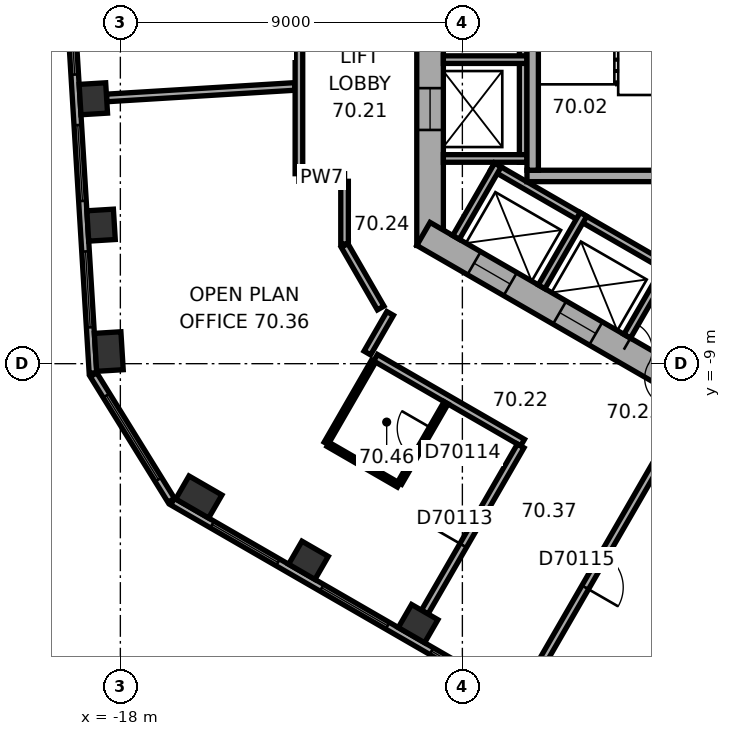
"""IFC4 building model, lengths in metres.
Left out: names, types, materials, properties, quantities, classifications, styles, units other than length and angle.
Written with IfcOpenShell. Run it as: python <this file> out.ifc"""

import sys

from ifc_helpers import new_model, si_unit, direction, frame, frame_2d, origin, origin_2d, place, context, subcontext, project, spatial, rectangle, extrude, element, fill, save


model = new_model("IFC4")
c1 = context("Model", 3, precision=1e-05, world=origin(), true_north=direction((0.0, 1.0)))
c2 = subcontext(c1, "Body", "Model", "MODEL_VIEW")
j1 = project(units=[si_unit("LENGTHUNIT", "METRE"), si_unit("PLANEANGLEUNIT", "RADIAN")], contexts=[c1])
p1 = place(None, origin())
s1 = spatial("IfcSite", under=j1, at=p1, CompositionType="ELEMENT")
p2 = place(p1, origin())
s2 = spatial("IfcBuilding", under=s1, at=p2, CompositionType="ELEMENT")
p3 = place(p2, frame((0.0, 0.0, 285.7)))
s3 = spatial("IfcBuildingStorey", under=s2, at=p3, CompositionType="ELEMENT", Elevation=285.7)
for number, where, z_axis, x_axis in (
    (1, (-18.711, -2.03, 0.0), (0.0, 0.0, 1.0), (0.061, -0.998, 0.0)),
    (2, (-18.508, -5.355, 0.0), (0.0, 0.0, 1.0), (0.061, -0.998, 0.0)),
):
    element("IfcColumn", number, at=place(p3, frame(where, z_axis=z_axis, x_axis=x_axis)), inside=s3, PredefinedType="COLUMN", context=c2, shape_type="SweptSolid", body=[
        extrude(rectangle(XDim=0.8, YDim=0.7, at=origin_2d()), origin(), (0.0, 0.0, 1.0), 3.7),
    ])
for number, where, z_axis, x_axis in (
    (3, (-18.304, -8.68, 0.0), (0.0, 0.0, 1.0), (0.061, -0.998, 0.0)),
    (4, (-15.936, -12.508, 0.0), (0.0, 0.0, 1.0), (0.866, -0.5, 0.0)),
):
    element("IfcColumn", number, at=place(p3, frame(where, z_axis=z_axis, x_axis=x_axis)), inside=s3, PredefinedType="COLUMN", context=c2, shape_type="SweptSolid", body=[
        extrude(rectangle(XDim=1.0, YDim=0.7, at=origin_2d()), origin(), (0.0, 0.0, 1.0), 3.7),
    ])
for number, where, z_axis, x_axis in (
    (5, (-13.05, -14.174, 0.0), (0.0, 0.0, 1.0), (0.866, -0.5, 0.0)),
    (6, (-10.165, -15.84, 0.0), (0.0, 0.0, 1.0), (0.866, -0.5, 0.0)),
):
    element("IfcColumn", number, at=place(p3, frame(where, z_axis=z_axis, x_axis=x_axis)), inside=s3, PredefinedType="COLUMN", context=c2, shape_type="SweptSolid", body=[
        extrude(rectangle(XDim=0.8, YDim=0.7, at=origin_2d()), origin(), (0.0, 0.0, 1.0), 3.7),
    ])
p4 = place(p3, frame((-9.85, 5.889, 0.0), z_axis=(0.0, 0.0, 1.0), x_axis=(0.0, -1.0, 0.0)))
e7 = element("IfcWall", 7, at=p4, inside=s3, PredefinedType="SHEAR", context=c2, shape_type="SweptSolid", body=[
    extrude(rectangle(XDim=11.778, YDim=0.7, at=frame_2d((5.889, 0.0))), origin(), (0.0, 0.0, 1.0), 3.7),
])
p5 = place(p4, frame((5.039, 0.0, 0.0)))
e8 = element("IfcOpeningElement", 8, at=p5, cuts=e7, PredefinedType="OPENING", context=c2, shape_type="SweptSolid", body=[
    extrude(rectangle(XDim=1.1, YDim=2.1, at=frame_2d((0.55, 1.05))), frame((0.0, 0.36, 0.0), z_axis=(0.0, -1.0, 0.0), x_axis=(1.0, 0.0, 0.0)), (0.0, 0.0, 1.0), 0.72),
])
p6 = place(p4, frame((7.639, 0.0, 0.0)))
e9 = element("IfcOpeningElement", 9, at=p6, cuts=e7, PredefinedType="OPENING", context=c2, shape_type="SweptSolid", body=[
    extrude(rectangle(XDim=1.1, YDim=2.1, at=frame_2d((0.55, 1.05))), frame((0.0, 0.36, 0.0), z_axis=(0.0, -1.0, 0.0), x_axis=(1.0, 0.0, 0.0)), (0.0, 0.0, 1.0), 0.72),
])
p7 = place(p3, frame((-10.025, -5.586, 0.0), z_axis=(0.0, 0.0, 1.0), x_axis=(0.866026453023, -0.499998182661, 0.0)))
e10 = element("IfcWall", 10, at=p7, inside=s3, PredefinedType="SHEAR", context=c2, shape_type="SweptSolid", body=[
    extrude(rectangle(XDim=11.778, YDim=0.7, at=frame_2d((5.889, 0.0))), origin(), (0.0, 0.0, 1.0), 3.7),
])
p8 = place(p7, frame((6.089, 0.0, 0.0)))
e11 = element("IfcOpeningElement", 11, at=p8, cuts=e10, PredefinedType="OPENING", context=c2, shape_type="SweptSolid", body=[
    extrude(rectangle(XDim=1.5, YDim=2.1, at=frame_2d((0.75, 1.05))), frame((0.0, 0.36, 0.0), z_axis=(0.0, -1.0, 0.0), x_axis=(1.0, 0.0, 0.0)), (0.0, 0.0, 1.0), 0.72),
])
p9 = place(p7, frame((1.539, 0.0, 0.0)))
e12 = element("IfcOpeningElement", 12, at=p9, cuts=e10, PredefinedType="OPENING", context=c2, shape_type="SweptSolid", body=[
    extrude(rectangle(XDim=1.1, YDim=2.1, at=frame_2d((0.55, 1.05))), frame((0.0, 0.36, 0.0), z_axis=(0.0, -1.0, 0.0), x_axis=(1.0, 0.0, 0.0)), (0.0, 0.0, 1.0), 0.72),
])
p10 = place(p7, frame((4.139, 0.0, 0.0)))
e13 = element("IfcOpeningElement", 13, at=p10, cuts=e10, PredefinedType="OPENING", context=c2, shape_type="SweptSolid", body=[
    extrude(rectangle(XDim=1.1, YDim=2.1, at=frame_2d((0.55, 1.05))), frame((0.0, 0.36, 0.0), z_axis=(0.0, -1.0, 0.0), x_axis=(1.0, 0.0, 0.0)), (0.0, 0.0, 1.0), 0.72),
])
p11 = place(p3, frame((-19.803, 8.454, 0.0), z_axis=(0.0, 0.0, 1.0), x_axis=(0.061036717565, -0.998135521414, 0.0)))
e14 = element("IfcWall", 14, at=p11, inside=s3, PredefinedType="STANDARD", context=c2, shape_type="SweptSolid", body=[
    extrude(rectangle(XDim=17.731, YDim=0.2, at=frame_2d((8.866, 0.0))), origin(), (0.0, 0.0, 1.0), 3.7),
])
p12 = place(p11, frame((1.202, 0.0, 0.9)))
e15 = element("IfcOpeningElement", 15, at=p12, cuts=e14, PredefinedType="OPENING", context=c2, shape_type="SweptSolid", body=[
    extrude(rectangle(XDim=2.0, YDim=2.0, at=frame_2d((1.0, 1.0))), frame((0.0, 0.11, 0.0), z_axis=(0.0, -1.0, 0.0), x_axis=(1.0, 0.0, 0.0)), (0.0, 0.0, 1.0), 0.22),
])
p13 = place(p11, frame((4.533, 0.0, 0.9)))
e16 = element("IfcOpeningElement", 16, at=p13, cuts=e14, PredefinedType="OPENING", context=c2, shape_type="SweptSolid", body=[
    extrude(rectangle(XDim=2.0, YDim=2.0, at=frame_2d((1.0, 1.0))), frame((0.0, 0.11, 0.0), z_axis=(0.0, -1.0, 0.0), x_axis=(1.0, 0.0, 0.0)), (0.0, 0.0, 1.0), 0.22),
])
p14 = place(p11, frame((7.865, 0.0, 0.9)))
e17 = element("IfcOpeningElement", 17, at=p14, cuts=e14, PredefinedType="OPENING", context=c2, shape_type="SweptSolid", body=[
    extrude(rectangle(XDim=2.0, YDim=2.0, at=frame_2d((1.0, 1.0))), frame((0.0, 0.11, 0.0), z_axis=(0.0, -1.0, 0.0), x_axis=(1.0, 0.0, 0.0)), (0.0, 0.0, 1.0), 0.22),
])
p15 = place(p11, frame((11.197, 0.0, 0.9)))
e18 = element("IfcOpeningElement", 18, at=p15, cuts=e14, PredefinedType="OPENING", context=c2, shape_type="SweptSolid", body=[
    extrude(rectangle(XDim=2.0, YDim=2.0, at=frame_2d((1.0, 1.0))), frame((0.0, 0.11, 0.0), z_axis=(0.0, -1.0, 0.0), x_axis=(1.0, 0.0, 0.0)), (0.0, 0.0, 1.0), 0.22),
])
p16 = place(p11, frame((14.528, 0.0, 0.9)))
e19 = element("IfcOpeningElement", 19, at=p16, cuts=e14, PredefinedType="OPENING", context=c2, shape_type="SweptSolid", body=[
    extrude(rectangle(XDim=2.0, YDim=2.0, at=frame_2d((1.0, 1.0))), frame((0.0, 0.11, 0.0), z_axis=(0.0, -1.0, 0.0), x_axis=(1.0, 0.0, 0.0)), (0.0, 0.0, 1.0), 0.22),
])
p17 = place(p3, frame((-18.706, -9.291, 0.0), z_axis=(0.0, 0.0, 1.0), x_axis=(0.526209683648, -0.850354848775, 0.0)))
e20 = element("IfcWall", 20, at=p17, inside=s3, PredefinedType="STANDARD", context=c2, shape_type="SweptSolid", body=[
    extrude(rectangle(XDim=3.886, YDim=0.2, at=frame_2d((1.943, 0.0))), origin(), (0.0, 0.0, 1.0), 3.7),
])
p18 = place(p17, frame((0.643, 0.0, 0.9)))
e21 = element("IfcOpeningElement", 21, at=p18, cuts=e20, PredefinedType="OPENING", context=c2, shape_type="SweptSolid", body=[
    extrude(rectangle(XDim=2.6, YDim=2.0, at=frame_2d((1.3, 1.0))), frame((0.0, 0.11, 0.0), z_axis=(0.0, -1.0, 0.0), x_axis=(1.0, 0.0, 0.0)), (0.0, 0.0, 1.0), 0.22),
])
p19 = place(p3, frame((-16.626, -12.629, 0.0), z_axis=(0.0, 0.0, 1.0), x_axis=(0.866026460444, -0.499998169808, 0.0)))
e22 = element("IfcWall", 22, at=p19, inside=s3, PredefinedType="STANDARD", context=c2, shape_type="SweptSolid", body=[
    extrude(rectangle(XDim=17.731, YDim=0.2, at=frame_2d((8.866, 0.0))), origin(), (0.0, 0.0, 1.0), 3.7),
])
p20 = place(p19, frame((1.203, 0.0, 0.9)))
e23 = element("IfcOpeningElement", 23, at=p20, cuts=e22, PredefinedType="OPENING", context=c2, shape_type="SweptSolid", body=[
    extrude(rectangle(XDim=2.0, YDim=2.0, at=frame_2d((1.0, 1.0))), frame((0.0, 0.11, 0.0), z_axis=(0.0, -1.0, 0.0), x_axis=(1.0, 0.0, 0.0)), (0.0, 0.0, 1.0), 0.22),
])
p21 = place(p19, frame((4.535, 0.0, 0.9)))
e24 = element("IfcOpeningElement", 24, at=p21, cuts=e22, PredefinedType="OPENING", context=c2, shape_type="SweptSolid", body=[
    extrude(rectangle(XDim=2.0, YDim=2.0, at=frame_2d((1.0, 1.0))), frame((0.0, 0.11, 0.0), z_axis=(0.0, -1.0, 0.0), x_axis=(1.0, 0.0, 0.0)), (0.0, 0.0, 1.0), 0.22),
])
p22 = place(p19, frame((7.867, 0.0, 0.9)))
e25 = element("IfcOpeningElement", 25, at=p22, cuts=e22, PredefinedType="OPENING", context=c2, shape_type="SweptSolid", body=[
    extrude(rectangle(XDim=2.0, YDim=2.0, at=frame_2d((1.0, 1.0))), frame((0.0, 0.11, 0.0), z_axis=(0.0, -1.0, 0.0), x_axis=(1.0, 0.0, 0.0)), (0.0, 0.0, 1.0), 0.22),
])
p23 = place(p19, frame((11.198, 0.0, 0.9)))
e26 = element("IfcOpeningElement", 26, at=p23, cuts=e22, PredefinedType="OPENING", context=c2, shape_type="SweptSolid", body=[
    extrude(rectangle(XDim=2.0, YDim=2.0, at=frame_2d((1.0, 1.0))), frame((0.0, 0.11, 0.0), z_axis=(0.0, -1.0, 0.0), x_axis=(1.0, 0.0, 0.0)), (0.0, 0.0, 1.0), 0.22),
])
p24 = place(p19, frame((14.53, 0.0, 0.9)))
e27 = element("IfcOpeningElement", 27, at=p24, cuts=e22, PredefinedType="OPENING", context=c2, shape_type="SweptSolid", body=[
    extrude(rectangle(XDim=2.0, YDim=2.0, at=frame_2d((1.0, 1.0))), frame((0.0, 0.11, 0.0), z_axis=(0.0, -1.0, 0.0), x_axis=(1.0, 0.0, 0.0)), (0.0, 0.0, 1.0), 0.22),
])
p25 = place(p3, frame((-7.4, 4.3, 0.0), z_axis=(0.0, 0.0, 1.0), x_axis=(0.0, -1.0, 0.0)))
e28 = element("IfcWall", 28, at=p25, inside=s3, PredefinedType="PARTITIONING", context=c2, shape_type="SweptSolid", body=[
    extrude(rectangle(XDim=8.0, YDim=0.2, at=frame_2d((4.0, 0.0))), origin(), (0.0, 0.0, 1.0), 3.42),
])
for number, where, z_axis, x_axis in (
    (29, (-7.3, -1.0, 0.0), (0.0, 0.0, 1.0), (-1.0, 0.0, 0.0)),
    (30, (-7.3, -3.6, 0.0), (0.0, 0.0, 1.0), (-1.0, 0.0, 0.0)),
):
    element("IfcWall", number, at=place(p3, frame(where, z_axis=z_axis, x_axis=x_axis)), inside=s3, PredefinedType="PARTITIONING", context=c2, shape_type="SweptSolid", body=[
        extrude(rectangle(XDim=2.2, YDim=0.2, at=frame_2d((1.1, 0.0))), origin(), (0.0, 0.0, 1.0), 3.42),
    ])
p26 = place(p3, frame((-8.203, -3.809, 0.0), z_axis=(0.0, 0.0, 1.0), x_axis=(0.866028230842, -0.499995103361, 0.0)))
e31 = element("IfcWall", 31, at=p26, inside=s3, PredefinedType="PARTITIONING", context=c2, shape_type="SweptSolid", body=[
    extrude(rectangle(XDim=5.4, YDim=0.2, at=frame_2d((2.7, 0.0))), origin(), (0.0, 0.0, 1.0), 3.42),
])
for number, where, z_axis, x_axis in (
    (32, (-8.067, -3.772, 0.0), (0.0, 0.0, 1.0), (-0.5, -0.866, 0.0)),
    (33, (-5.815, -5.072, 0.0), (0.0, 0.0, 1.0), (-0.5, -0.866, 0.0)),
):
    element("IfcWall", number, at=place(p3, frame(where, z_axis=z_axis, x_axis=x_axis)), inside=s3, PredefinedType="PARTITIONING", context=c2, shape_type="SweptSolid", body=[
        extrude(rectangle(XDim=2.2, YDim=0.2, at=frame_2d((1.1, 0.0))), origin(), (0.0, 0.0, 1.0), 3.42),
    ])
p27 = place(p3, frame((-3.563, -6.372, 0.0), z_axis=(0.0, 0.0, 1.0), x_axis=(-0.499994660107, -0.866028486751, 0.0)))
e34 = element("IfcWall", 34, at=p27, inside=s3, PredefinedType="PARTITIONING", context=c2, shape_type="SweptSolid", body=[
    extrude(rectangle(XDim=2.2, YDim=0.2, at=frame_2d((1.1, 0.0))), origin(), (0.0, 0.0, 1.0), 3.42),
])
p28 = place(p3, frame((-2.6, -4.06, 0.0), z_axis=(0.0, 0.0, 1.0), x_axis=(-1.0, 0.0, 0.0)))
e35 = element("IfcWall", 35, at=p28, inside=s3, PredefinedType="SHEAR", context=c2, shape_type="SweptSolid", body=[
    extrude(rectangle(XDim=4.7, YDim=0.3, at=frame_2d((2.35, 0.0))), origin(), (0.0, 0.0, 1.0), 3.42),
])
p29 = place(p3, frame((-7.15, 3.15, 0.0), z_axis=(0.0, 0.0, 1.0), x_axis=(0.0, -1.0, 0.0)))
e36 = element("IfcWall", 36, at=p29, inside=s3, PredefinedType="SHEAR", context=c2, shape_type="SweptSolid", body=[
    extrude(rectangle(XDim=7.06, YDim=0.3, at=frame_2d((3.53, 0.0))), origin(), (0.0, 0.0, 1.0), 3.42),
])
p30 = place(p3, frame((-18.362, -2.008, 0.0), z_axis=(0.0, 0.0, 1.0), x_axis=(0.998135748374, 0.061033005966, 0.0)))
e37 = element("IfcWall", 37, at=p30, inside=s3, PredefinedType="PARTITIONING", context=c2, shape_type="SweptSolid", body=[
    extrude(rectangle(XDim=4.96, YDim=0.2, at=frame_2d((2.48, 0.0))), origin(), (0.0, 0.0, 1.0), 3.42),
])
p31 = place(p3, frame((-13.301, -4.101, 0.0), z_axis=(0.0, 0.0, 1.0), x_axis=(1.0, 0.0, 0.0)))
e38 = element("IfcWall", 38, at=p31, inside=s3, PredefinedType="PARTITIONING", context=c2, shape_type="SweptSolid", body=[
    extrude(rectangle(XDim=1.201, YDim=0.2, at=frame_2d((0.601, 0.0))), origin(), (0.0, 0.0, 1.0), 3.42),
])
p32 = place(p3, frame((-13.301, 1.851, 0.0), z_axis=(0.0, 0.0, 1.0), x_axis=(0.0, -1.0, 0.0)))
e39 = element("IfcWall", 39, at=p32, inside=s3, PredefinedType="PARTITIONING", context=c2, shape_type="SweptSolid", body=[
    extrude(rectangle(XDim=5.852, YDim=0.2, at=frame_2d((2.926, 0.0))), origin(), (0.0, 0.0, 1.0), 3.42),
])
p33 = place(p3, frame((-12.585, -11.095, 0.0), z_axis=(0.0, 0.0, 1.0), x_axis=(0.500004234368, 0.866022959057, 0.0)))
e40 = element("IfcWall", 40, at=p33, inside=s3, PredefinedType="PARTITIONING", context=c2, shape_type="SweptSolid", body=[
    extrude(rectangle(XDim=2.5, YDim=0.12, at=frame_2d((1.25, 0.0))), origin(), (0.0, 0.0, 1.0), 3.42),
])
p34 = place(p3, frame((-12.1, -5.889, 0.0), z_axis=(0.0, 0.0, 1.0), x_axis=(0.500063520245, -0.865988727248, 0.0)))
e41 = element("IfcWall", 41, at=p34, inside=s3, PredefinedType="PARTITIONING", context=c2, shape_type="SweptSolid", body=[
    extrude(rectangle(XDim=1.9, YDim=0.2, at=frame_2d((0.95, 0.0))), origin(), (0.0, 0.0, 1.0), 3.42),
])
p35 = place(p3, frame((-12.1, -4.201, 0.0), z_axis=(0.0, 0.0, 1.0), x_axis=(0.0, -1.0, 0.0)))
e42 = element("IfcWall", 42, at=p35, inside=s3, PredefinedType="PARTITIONING", context=c2, shape_type="SweptSolid", body=[
    extrude(rectangle(XDim=1.648, YDim=0.2, at=frame_2d((0.824, 0.0))), origin(), (0.0, 0.0, 1.0), 3.42),
])
p36 = place(p3, frame((-11.285, -8.844, 0.0), z_axis=(0.0, 0.0, 1.0), x_axis=(0.866021785011, -0.500006267848, 0.0)))
e43 = element("IfcWall", 43, at=p36, inside=s3, PredefinedType="PARTITIONING", context=c2, shape_type="SweptSolid", body=[
    extrude(rectangle(XDim=4.468, YDim=0.2, at=frame_2d((2.234, 0.0))), origin(), (0.0, 0.0, 1.0), 3.42),
])
p37 = place(p3, frame((-10.901, -7.678, 0.0), z_axis=(0.0, 0.0, 1.0), x_axis=(-0.500074377092, -0.865982457891, 0.0)))
e44 = element("IfcWall", 44, at=p37, inside=s3, PredefinedType="PARTITIONING", context=c2, shape_type="SweptSolid", body=[
    extrude(rectangle(XDim=1.201, YDim=0.2, at=frame_2d((0.601, 0.0))), origin(), (0.0, 0.0, 1.0), 3.42),
])
p38 = place(p3, frame((-10.679, -12.195, 0.0), z_axis=(0.0, 0.0, 1.0), x_axis=(-0.866037418504, 0.499979189318, 0.0)))
e45 = element("IfcWall", 45, at=p38, inside=s3, PredefinedType="PARTITIONING", context=c2, shape_type="SweptSolid", body=[
    extrude(rectangle(XDim=2.14, YDim=0.12, at=frame_2d((1.07, 0.0))), origin(), (0.0, 0.0, 1.0), 3.42),
])
p39 = place(p3, frame((-9.99, -15.537, 0.0), z_axis=(0.0, 0.0, 1.0), x_axis=(0.499966611936, 0.866044679534, 0.0)))
e46 = element("IfcWall", 46, at=p39, inside=s3, PredefinedType="PARTITIONING", context=c2, shape_type="SweptSolid", body=[
    extrude(rectangle(XDim=5.049, YDim=0.2, at=frame_2d((2.524, 0.0))), origin(), (0.0, 0.0, 1.0), 2.87),
])
p40 = place(p39, frame((2.024, 0.0, 0.0)))
e47 = element("IfcOpeningElement", 47, at=p40, cuts=e46, PredefinedType="OPENING", context=c2, shape_type="SweptSolid", body=[
    extrude(rectangle(XDim=1.0, YDim=2.1, at=frame_2d((0.5, 1.05))), frame((0.0, 0.11, 0.0), z_axis=(0.0, -1.0, 0.0), x_axis=(1.0, 0.0, 0.0)), (0.0, 0.0, 1.0), 0.22),
])
p41 = place(p3, frame((-9.429, -10.03, 0.0), z_axis=(0.0, 0.0, 1.0), x_axis=(-0.500034220881, -0.866005645448, 0.0)))
e48 = element("IfcWall", 48, at=p41, inside=s3, PredefinedType="PARTITIONING", context=c2, shape_type="SweptSolid", body=[
    extrude(rectangle(XDim=2.44, YDim=0.12, at=frame_2d((1.22, 0.0))), origin(), (0.0, 0.0, 1.0), 3.42),
])
p42 = place(p41, frame((0.77, 0.0, 0.0)))
e49 = element("IfcOpeningElement", 49, at=p42, cuts=e48, PredefinedType="OPENING", context=c2, shape_type="SweptSolid", body=[
    extrude(rectangle(XDim=0.9, YDim=2.1, at=frame_2d((0.45, 1.05))), frame((0.0, 0.07, 0.0), z_axis=(0.0, -1.0, 0.0), x_axis=(1.0, 0.0, 0.0)), (0.0, 0.0, 1.0), 0.14),
])
p43 = place(p3, frame((-7.105, -17.202, 0.0), z_axis=(0.0, 0.0, 1.0), x_axis=(0.499988692146, 0.866031932279, 0.0)))
e50 = element("IfcWall", 50, at=p43, inside=s3, PredefinedType="PARTITIONING", context=c2, shape_type="SweptSolid", body=[
    extrude(rectangle(XDim=6.35, YDim=0.2, at=frame_2d((3.175, 0.0))), origin(), (0.0, 0.0, 1.0), 3.42),
])
p44 = place(p43, frame((2.675, 0.0, 0.0)))
e51 = element("IfcOpeningElement", 51, at=p44, cuts=e50, PredefinedType="OPENING", context=c2, shape_type="SweptSolid", body=[
    extrude(rectangle(XDim=1.0, YDim=2.1, at=frame_2d((0.5, 1.05))), frame((0.0, 0.11, 0.0), z_axis=(0.0, -1.0, 0.0), x_axis=(1.0, 0.0, 0.0)), (0.0, 0.0, 1.0), 0.22),
])
p45 = place(p14, origin())
e52 = element("IfcWindow", 52, at=p45, inside=s3, PartitioningType="SINGLE_PANEL", PredefinedType="WINDOW", context=c2, shape_type="SweptSolid", body=[
    extrude(rectangle(XDim=2.0, YDim=2.0, at=frame_2d((1.0, 1.0))), frame((0.0, 0.03, 0.0), z_axis=(0.0, -1.0, 0.0), x_axis=(1.0, 0.0, 0.0)), (0.0, 0.0, 1.0), 0.06),
])
fill(e17, e52)
p46 = place(p15, origin())
e53 = element("IfcWindow", 53, at=p46, inside=s3, PartitioningType="SINGLE_PANEL", PredefinedType="WINDOW", context=c2, shape_type="SweptSolid", body=[
    extrude(rectangle(XDim=2.0, YDim=2.0, at=frame_2d((1.0, 1.0))), frame((0.0, 0.03, 0.0), z_axis=(0.0, -1.0, 0.0), x_axis=(1.0, 0.0, 0.0)), (0.0, 0.0, 1.0), 0.06),
])
fill(e18, e53)
p47 = place(p16, origin())
e54 = element("IfcWindow", 54, at=p47, inside=s3, PartitioningType="SINGLE_PANEL", PredefinedType="WINDOW", context=c2, shape_type="SweptSolid", body=[
    extrude(rectangle(XDim=2.0, YDim=2.0, at=frame_2d((1.0, 1.0))), frame((0.0, 0.03, 0.0), z_axis=(0.0, -1.0, 0.0), x_axis=(1.0, 0.0, 0.0)), (0.0, 0.0, 1.0), 0.06),
])
fill(e19, e54)
p48 = place(p18, origin())
e55 = element("IfcWindow", 55, at=p48, inside=s3, PartitioningType="SINGLE_PANEL", PredefinedType="WINDOW", context=c2, shape_type="SweptSolid", body=[
    extrude(rectangle(XDim=2.6, YDim=2.0, at=frame_2d((1.3, 1.0))), frame((0.0, 0.03, 0.0), z_axis=(0.0, -1.0, 0.0), x_axis=(1.0, 0.0, 0.0)), (0.0, 0.0, 1.0), 0.06),
])
fill(e21, e55)
p49 = place(p20, origin())
e56 = element("IfcWindow", 56, at=p49, inside=s3, PartitioningType="SINGLE_PANEL", PredefinedType="WINDOW", context=c2, shape_type="SweptSolid", body=[
    extrude(rectangle(XDim=2.0, YDim=2.0, at=frame_2d((1.0, 1.0))), frame((0.0, 0.03, 0.0), z_axis=(0.0, -1.0, 0.0), x_axis=(1.0, 0.0, 0.0)), (0.0, 0.0, 1.0), 0.06),
])
fill(e23, e56)
p50 = place(p21, origin())
e57 = element("IfcWindow", 57, at=p50, inside=s3, PartitioningType="SINGLE_PANEL", PredefinedType="WINDOW", context=c2, shape_type="SweptSolid", body=[
    extrude(rectangle(XDim=2.0, YDim=2.0, at=frame_2d((1.0, 1.0))), frame((0.0, 0.03, 0.0), z_axis=(0.0, -1.0, 0.0), x_axis=(1.0, 0.0, 0.0)), (0.0, 0.0, 1.0), 0.06),
])
fill(e24, e57)
p51 = place(p22, origin())
e58 = element("IfcWindow", 58, at=p51, inside=s3, PartitioningType="SINGLE_PANEL", PredefinedType="WINDOW", context=c2, shape_type="SweptSolid", body=[
    extrude(rectangle(XDim=2.0, YDim=2.0, at=frame_2d((1.0, 1.0))), frame((0.0, 0.03, 0.0), z_axis=(0.0, -1.0, 0.0), x_axis=(1.0, 0.0, 0.0)), (0.0, 0.0, 1.0), 0.06),
])
fill(e25, e58)
p52 = place(p8, origin())
e59 = element("IfcDoor", 59, at=p52, inside=s3, OperationType="DOUBLE_DOOR_SINGLE_SWING", PredefinedType="DOOR", context=c2, shape_type="SweptSolid", body=[
    extrude(rectangle(XDim=1.5, YDim=2.1, at=frame_2d((0.75, 1.05))), frame((0.0, 0.025, 0.0), z_axis=(0.0, -1.0, 0.0), x_axis=(1.0, 0.0, 0.0)), (0.0, 0.0, 1.0), 0.05),
])
fill(e11, e59)
p53 = place(p6, origin())
e60 = element("IfcDoor", 60, at=p53, inside=s3, OperationType="DOUBLE_DOOR_SLIDING", PredefinedType="DOOR", context=c2, shape_type="SweptSolid", body=[
    extrude(rectangle(XDim=1.1, YDim=2.1, at=frame_2d((0.55, 1.05))), frame((0.0, 0.025, 0.0), z_axis=(0.0, -1.0, 0.0), x_axis=(1.0, 0.0, 0.0)), (0.0, 0.0, 1.0), 0.05),
])
fill(e9, e60)
p54 = place(p9, origin())
e61 = element("IfcDoor", 61, at=p54, inside=s3, OperationType="DOUBLE_DOOR_SLIDING", PredefinedType="DOOR", context=c2, shape_type="SweptSolid", body=[
    extrude(rectangle(XDim=1.1, YDim=2.1, at=frame_2d((0.55, 1.05))), frame((0.0, 0.025, 0.0), z_axis=(0.0, -1.0, 0.0), x_axis=(1.0, 0.0, 0.0)), (0.0, 0.0, 1.0), 0.05),
])
fill(e12, e61)
p55 = place(p10, origin())
e62 = element("IfcDoor", 62, at=p55, inside=s3, OperationType="DOUBLE_DOOR_SLIDING", PredefinedType="DOOR", context=c2, shape_type="SweptSolid", body=[
    extrude(rectangle(XDim=1.1, YDim=2.1, at=frame_2d((0.55, 1.05))), frame((0.0, 0.025, 0.0), z_axis=(0.0, -1.0, 0.0), x_axis=(1.0, 0.0, 0.0)), (0.0, 0.0, 1.0), 0.05),
])
fill(e13, e62)
p56 = place(p40, origin())
e63 = element("IfcDoor", 63, at=p56, inside=s3, OperationType="SINGLE_SWING_LEFT", PredefinedType="DOOR", context=c2, shape_type="SweptSolid", body=[
    extrude(rectangle(XDim=1.0, YDim=2.1, at=frame_2d((0.5, 1.05))), frame((0.0, 0.025, 0.0), z_axis=(0.0, -1.0, 0.0), x_axis=(1.0, 0.0, 0.0)), (0.0, 0.0, 1.0), 0.05),
])
fill(e47, e63)
p57 = place(p42, origin())
e64 = element("IfcDoor", 64, at=p57, inside=s3, OperationType="SINGLE_SWING_LEFT", PredefinedType="DOOR", context=c2, shape_type="SweptSolid", body=[
    extrude(rectangle(XDim=0.9, YDim=2.1, at=frame_2d((0.45, 1.05))), frame((0.0, 0.025, 0.0), z_axis=(0.0, -1.0, 0.0), x_axis=(1.0, 0.0, 0.0)), (0.0, 0.0, 1.0), 0.05),
])
fill(e49, e64)
p58 = place(p44, origin())
e65 = element("IfcDoor", 65, at=p58, inside=s3, OperationType="SINGLE_SWING_LEFT", PredefinedType="DOOR", context=c2, shape_type="SweptSolid", body=[
    extrude(rectangle(XDim=1.0, YDim=2.1, at=frame_2d((0.5, 1.05))), frame((0.0, 0.025, 0.0), z_axis=(0.0, -1.0, 0.0), x_axis=(1.0, 0.0, 0.0)), (0.0, 0.0, 1.0), 0.05),
])
fill(e51, e65)
save(model, sys.argv[1])
